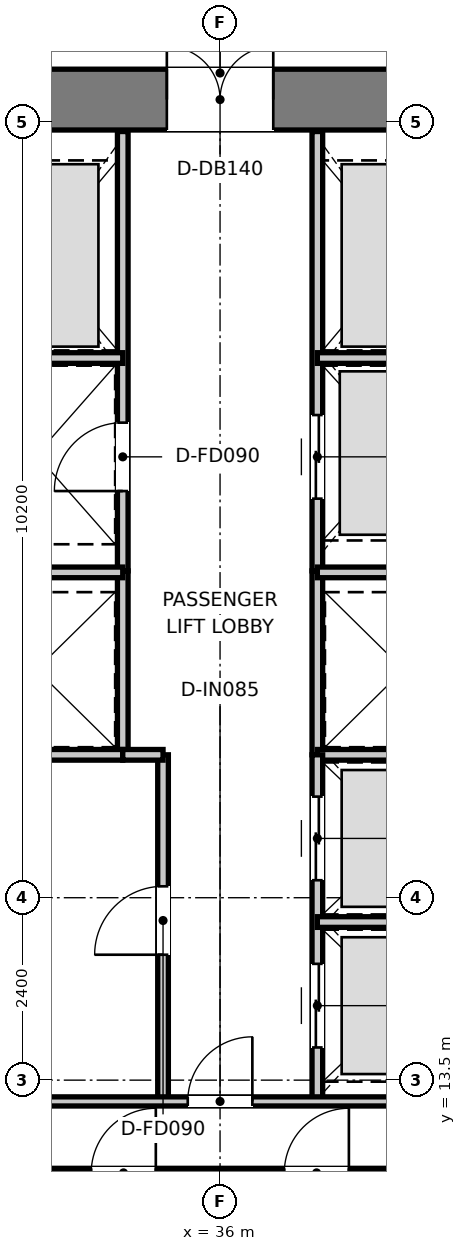
"""IFC4 building model, lengths in metres.
Left out: names, types, materials, properties, quantities, classifications, styles, units other than length and angle.
Written with IfcOpenShell. Run it as: python <this file> out.ifc"""

import sys

from ifc_helpers import new_model, si_unit, direction, frame, frame_2d, origin, place, context, subcontext, project, spatial, rectangle, extrude, element, fill, save


model = new_model("IFC4")
c1 = context("Model", 3, precision=1e-05, world=origin(), true_north=direction((0.0, 1.0)))
c2 = subcontext(c1, "Body", "Model", "MODEL_VIEW")
j1 = project(units=[si_unit("LENGTHUNIT", "METRE"), si_unit("PLANEANGLEUNIT", "RADIAN")], contexts=[c1])
p1 = place(None, origin())
s1 = spatial("IfcSite", under=j1, at=p1, CompositionType="ELEMENT")
p2 = place(p1, origin())
s2 = spatial("IfcBuilding", under=s1, at=p2, CompositionType="ELEMENT")
p3 = place(p2, frame((0.0, 0.0, 219.15)))
s3 = spatial("IfcBuildingStorey", under=s2, at=p3, CompositionType="ELEMENT", Elevation=219.15)
p4 = place(p3, frame((28.08, 26.4, 0.0), z_axis=(0.0, 0.0, 1.0), x_axis=(1.0, 0.0, 0.0)))
e1 = element("IfcWall", 1, at=p4, inside=s3, PredefinedType="SHEAR", context=c2, shape_type="SweptSolid", body=[
    extrude(rectangle(XDim=15.84, YDim=0.8, at=frame_2d((7.92, 0.0))), origin(), (0.0, 0.0, 1.0), 3.95),
])
p5 = place(p4, frame((7.22, 0.0, 0.0)))
e2 = element("IfcOpeningElement", 2, at=p5, cuts=e1, PredefinedType="OPENING", context=c2, shape_type="SweptSolid", body=[
    extrude(rectangle(XDim=1.4, YDim=2.2, at=frame_2d((0.7, 1.1))), frame((0.0, 0.41, 0.0), z_axis=(0.0, -1.0, 0.0), x_axis=(1.0, 0.0, 0.0)), (0.0, 0.0, 1.0), 0.82),
])
p6 = place(p4, frame((1.775, 0.0, 0.0)))
e3 = element("IfcOpeningElement", 3, at=p6, cuts=e1, PredefinedType="OPENING", context=c2, shape_type="SweptSolid", body=[
    extrude(rectangle(XDim=1.05, YDim=2.1, at=frame_2d((0.525, 1.05))), frame((0.0, 0.41, 0.0), z_axis=(0.0, -1.0, 0.0), x_axis=(1.0, 0.0, 0.0)), (0.0, 0.0, 1.0), 0.82),
])
p7 = place(p4, frame((13.015, 0.0, 0.0)))
e4 = element("IfcOpeningElement", 4, at=p7, cuts=e1, PredefinedType="OPENING", context=c2, shape_type="SweptSolid", body=[
    extrude(rectangle(XDim=1.05, YDim=2.1, at=frame_2d((0.525, 1.05))), frame((0.0, 0.41, 0.0), z_axis=(0.0, -1.0, 0.0), x_axis=(1.0, 0.0, 0.0)), (0.0, 0.0, 1.0), 0.82),
])
p8 = place(p3, frame((34.72, 20.2, 0.0), z_axis=(0.0, 0.0, 1.0), x_axis=(0.0, 1.0, 0.0)))
e5 = element("IfcWall", 5, at=p8, inside=s3, PredefinedType="PARTITIONING", context=c2, shape_type="SweptSolid", body=[
    extrude(rectangle(XDim=5.78, YDim=0.14, at=frame_2d((2.89, 0.0))), origin(), (0.0, 0.0, 1.0), 2.67),
])
p9 = place(p8, frame((1.05, 0.0, 0.0)))
e6 = element("IfcOpeningElement", 6, at=p9, cuts=e5, PredefinedType="OPENING", context=c2, shape_type="SweptSolid", body=[
    extrude(rectangle(XDim=0.9, YDim=2.1, at=frame_2d((0.45, 1.05))), frame((0.0, 0.08, 0.0), z_axis=(0.0, -1.0, 0.0), x_axis=(1.0, 0.0, 0.0)), (0.0, 0.0, 1.0), 0.16),
])
p10 = place(p3, frame((37.28, 20.2, 0.0), z_axis=(0.0, 0.0, 1.0), x_axis=(0.0, 1.0, 0.0)))
e7 = element("IfcWall", 7, at=p10, inside=s3, PredefinedType="PARTITIONING", context=c2, shape_type="SweptSolid", body=[
    extrude(rectangle(XDim=5.78, YDim=0.14, at=frame_2d((2.89, 0.0))), origin(), (0.0, 0.0, 1.0), 2.67),
])
p11 = place(p10, frame((0.95, 0.0, 0.0)))
e8 = element("IfcOpeningElement", 8, at=p11, cuts=e7, PredefinedType="OPENING", context=c2, shape_type="SweptSolid", body=[
    extrude(rectangle(XDim=1.1, YDim=2.15, at=frame_2d((0.55, 1.075))), frame((0.0, 0.08, 0.0), z_axis=(0.0, -1.0, 0.0), x_axis=(1.0, 0.0, 0.0)), (0.0, 0.0, 1.0), 0.16),
])
for number, where, z_axis, x_axis in (
    (9, (32.45, 23.0, 0.0), (0.0, 0.0, 1.0), (1.0, 0.0, 0.0)),
    (10, (37.28, 23.0, 0.0), (0.0, 0.0, 1.0), (1.0, 0.0, 0.0)),
):
    element("IfcWall", number, at=place(p3, frame(where, z_axis=z_axis, x_axis=x_axis)), inside=s3, PredefinedType="PARTITIONING", context=c2, shape_type="SweptSolid", body=[
        extrude(rectangle(XDim=2.27, YDim=0.14, at=frame_2d((1.135, 0.0))), origin(), (0.0, 0.0, 1.0), 2.67),
    ])
for number, where, z_axis, x_axis in (
    (11, (34.72, 17.78, 0.0), (0.0, 0.0, 1.0), (0.0, 1.0, 0.0)),
    (12, (37.28, 17.78, 0.0), (0.0, 0.0, 1.0), (0.0, 1.0, 0.0)),
):
    element("IfcWall", number, at=place(p3, frame(where, z_axis=z_axis, x_axis=x_axis)), inside=s3, PredefinedType="PARTITIONING", context=c2, shape_type="SweptSolid", body=[
        extrude(rectangle(XDim=2.42, YDim=0.14, at=frame_2d((1.21, 0.0))), origin(), (0.0, 0.0, 1.0), 3.67),
    ])
for number, where, z_axis, x_axis in (
    (13, (32.45, 17.78, 0.0), (0.0, 0.0, 1.0), (1.0, 0.0, 0.0)),
    (14, (32.45, 20.18, 0.0), (0.0, 0.0, 1.0), (1.0, 0.0, 0.0)),
    (15, (37.28, 17.78, 0.0), (0.0, 0.0, 1.0), (1.0, 0.0, 0.0)),
    (16, (37.28, 20.18, 0.0), (0.0, 0.0, 1.0), (1.0, 0.0, 0.0)),
):
    element("IfcWall", number, at=place(p3, frame(where, z_axis=z_axis, x_axis=x_axis)), inside=s3, PredefinedType="PARTITIONING", context=c2, shape_type="SweptSolid", body=[
        extrude(rectangle(XDim=2.27, YDim=0.14, at=frame_2d((1.135, 0.0))), origin(), (0.0, 0.0, 1.0), 3.67),
    ])
p12 = place(p3, frame((35.25, 13.22, 0.0), z_axis=(0.0, 0.0, 1.0), x_axis=(0.0, 1.0, 0.0)))
e17 = element("IfcWall", 17, at=p12, inside=s3, PredefinedType="PARTITIONING", context=c2, shape_type="SweptSolid", body=[
    extrude(rectangle(XDim=4.56, YDim=0.14, at=frame_2d((2.28, 0.0))), origin(), (0.0, 0.0, 1.0), 3.67),
])
p13 = place(p12, frame((1.93, 0.0, 0.0)))
e18 = element("IfcOpeningElement", 18, at=p13, cuts=e17, PredefinedType="OPENING", context=c2, shape_type="SweptSolid", body=[
    extrude(rectangle(XDim=0.9, YDim=2.1, at=frame_2d((0.45, 1.05))), frame((0.0, 0.08, 0.0), z_axis=(0.0, -1.0, 0.0), x_axis=(1.0, 0.0, 0.0)), (0.0, 0.0, 1.0), 0.16),
])
p14 = place(p3, frame((34.72, 17.78, 0.0), z_axis=(0.0, 0.0, 1.0), x_axis=(1.0, 0.0, 0.0)))
e19 = element("IfcWall", 19, at=p14, inside=s3, PredefinedType="PARTITIONING", context=c2, shape_type="SweptSolid", body=[
    extrude(rectangle(XDim=0.53, YDim=0.14, at=frame_2d((0.265, 0.0))), origin(), (0.0, 0.0, 1.0), 3.67),
])
p15 = place(p3, frame((37.28, 13.22, 0.0), z_axis=(0.0, 0.0, 1.0), x_axis=(0.0, 1.0, 0.0)))
e20 = element("IfcWall", 20, at=p15, inside=s3, PredefinedType="PARTITIONING", context=c2, shape_type="SweptSolid", body=[
    extrude(rectangle(XDim=4.56, YDim=0.14, at=frame_2d((2.28, 0.0))), origin(), (0.0, 0.0, 1.0), 3.67),
])
p16 = place(p15, frame((0.71, 0.0, 0.0)))
e21 = element("IfcOpeningElement", 21, at=p16, cuts=e20, PredefinedType="OPENING", context=c2, shape_type="SweptSolid", body=[
    extrude(rectangle(XDim=1.1, YDim=2.15, at=frame_2d((0.55, 1.075))), frame((0.0, 0.08, 0.0), z_axis=(0.0, -1.0, 0.0), x_axis=(1.0, 0.0, 0.0)), (0.0, 0.0, 1.0), 0.16),
])
p17 = place(p15, frame((2.91, 0.0, 0.0)))
e22 = element("IfcOpeningElement", 22, at=p17, cuts=e20, PredefinedType="OPENING", context=c2, shape_type="SweptSolid", body=[
    extrude(rectangle(XDim=1.1, YDim=2.15, at=frame_2d((0.55, 1.075))), frame((0.0, 0.08, 0.0), z_axis=(0.0, -1.0, 0.0), x_axis=(1.0, 0.0, 0.0)), (0.0, 0.0, 1.0), 0.16),
])
p18 = place(p3, frame((37.28, 15.58, 0.0), z_axis=(0.0, 0.0, 1.0), x_axis=(1.0, 0.0, 0.0)))
e23 = element("IfcWall", 23, at=p18, inside=s3, PredefinedType="PARTITIONING", context=c2, shape_type="SweptSolid", body=[
    extrude(rectangle(XDim=2.27, YDim=0.14, at=frame_2d((1.135, 0.0))), origin(), (0.0, 0.0, 1.0), 3.67),
])
p19 = place(p3, frame((32.21, 13.22, 0.0), z_axis=(0.0, 0.0, 1.0), x_axis=(1.0, 0.0, 0.0)))
e24 = element("IfcWall", 24, at=p19, inside=s3, PredefinedType="PARTITIONING", context=c2, shape_type="SweptSolid", body=[
    extrude(rectangle(XDim=7.58, YDim=0.12, at=frame_2d((3.79, 0.0))), origin(), (0.0, 0.0, 1.0), 3.67),
])
p20 = place(p19, frame((3.365, 0.0, 0.0)))
e25 = element("IfcOpeningElement", 25, at=p20, cuts=e24, PredefinedType="OPENING", context=c2, shape_type="SweptSolid", body=[
    extrude(rectangle(XDim=0.85, YDim=2.1, at=frame_2d((0.425, 1.05))), frame((0.0, 0.07, 0.0), z_axis=(0.0, -1.0, 0.0), x_axis=(1.0, 0.0, 0.0)), (0.0, 0.0, 1.0), 0.14),
])
p21 = place(p3, frame((32.21, 12.28, 0.0), z_axis=(0.0, 0.0, 1.0), x_axis=(1.0, 0.0, 0.0)))
e26 = element("IfcWall", 26, at=p21, inside=s3, PredefinedType="PARTITIONING", context=c2, shape_type="SweptSolid", body=[
    extrude(rectangle(XDim=7.58, YDim=0.12, at=frame_2d((3.79, 0.0))), origin(), (0.0, 0.0, 1.0), 3.67),
])
p22 = place(p21, frame((0.205, 0.0, 0.0)))
e27 = element("IfcOpeningElement", 27, at=p22, cuts=e26, PredefinedType="OPENING", context=c2, shape_type="SweptSolid", body=[
    extrude(rectangle(XDim=0.85, YDim=2.1, at=frame_2d((0.425, 1.05))), frame((0.0, 0.07, 0.0), z_axis=(0.0, -1.0, 0.0), x_axis=(1.0, 0.0, 0.0)), (0.0, 0.0, 1.0), 0.14),
])
p23 = place(p21, frame((2.095, 0.0, 0.0)))
e28 = element("IfcOpeningElement", 28, at=p23, cuts=e26, PredefinedType="OPENING", context=c2, shape_type="SweptSolid", body=[
    extrude(rectangle(XDim=0.85, YDim=2.1, at=frame_2d((0.425, 1.05))), frame((0.0, 0.07, 0.0), z_axis=(0.0, -1.0, 0.0), x_axis=(1.0, 0.0, 0.0)), (0.0, 0.0, 1.0), 0.14),
])
p24 = place(p21, frame((4.635, 0.0, 0.0)))
e29 = element("IfcOpeningElement", 29, at=p24, cuts=e26, PredefinedType="OPENING", context=c2, shape_type="SweptSolid", body=[
    extrude(rectangle(XDim=0.85, YDim=2.1, at=frame_2d((0.425, 1.05))), frame((0.0, 0.07, 0.0), z_axis=(0.0, -1.0, 0.0), x_axis=(1.0, 0.0, 0.0)), (0.0, 0.0, 1.0), 0.14),
])
p25 = place(p21, frame((6.525, 0.0, 0.0)))
e30 = element("IfcOpeningElement", 30, at=p25, cuts=e26, PredefinedType="OPENING", context=c2, shape_type="SweptSolid", body=[
    extrude(rectangle(XDim=0.85, YDim=2.1, at=frame_2d((0.425, 1.05))), frame((0.0, 0.07, 0.0), z_axis=(0.0, -1.0, 0.0), x_axis=(1.0, 0.0, 0.0)), (0.0, 0.0, 1.0), 0.14),
])
p26 = place(p5, origin())
e31 = element("IfcDoor", 31, at=p26, inside=s3, OperationType="DOUBLE_DOOR_SINGLE_SWING", PredefinedType="DOOR", context=c2, shape_type="SweptSolid", body=[
    extrude(rectangle(XDim=1.4, YDim=2.2, at=frame_2d((0.7, 1.1))), frame((0.0, 0.025, 0.0), z_axis=(0.0, -1.0, 0.0), x_axis=(1.0, 0.0, 0.0)), (0.0, 0.0, 1.0), 0.05),
])
fill(e2, e31)
p27 = place(p9, origin())
e32 = element("IfcDoor", 32, at=p27, inside=s3, OperationType="SINGLE_SWING_LEFT", PredefinedType="DOOR", context=c2, shape_type="SweptSolid", body=[
    extrude(rectangle(XDim=0.9, YDim=2.1, at=frame_2d((0.45, 1.05))), frame((0.0, 0.025, 0.0), z_axis=(0.0, -1.0, 0.0), x_axis=(1.0, 0.0, 0.0)), (0.0, 0.0, 1.0), 0.05),
])
fill(e6, e32)
p28 = place(p11, origin())
e33 = element("IfcDoor", 33, at=p28, inside=s3, OperationType="DOUBLE_DOOR_SLIDING", PredefinedType="DOOR", context=c2, shape_type="SweptSolid", body=[
    extrude(rectangle(XDim=1.1, YDim=2.15, at=frame_2d((0.55, 1.075))), frame((0.0, 0.025, 0.0), z_axis=(0.0, -1.0, 0.0), x_axis=(1.0, 0.0, 0.0)), (0.0, 0.0, 1.0), 0.05),
])
fill(e8, e33)
p29 = place(p13, origin())
e34 = element("IfcDoor", 34, at=p29, inside=s3, OperationType="SINGLE_SWING_LEFT", PredefinedType="DOOR", context=c2, shape_type="SweptSolid", body=[
    extrude(rectangle(XDim=0.9, YDim=2.1, at=frame_2d((0.45, 1.05))), frame((0.0, 0.025, 0.0), z_axis=(0.0, -1.0, 0.0), x_axis=(1.0, 0.0, 0.0)), (0.0, 0.0, 1.0), 0.05),
])
fill(e18, e34)
p30 = place(p16, origin())
e35 = element("IfcDoor", 35, at=p30, inside=s3, OperationType="DOUBLE_DOOR_SLIDING", PredefinedType="DOOR", context=c2, shape_type="SweptSolid", body=[
    extrude(rectangle(XDim=1.1, YDim=2.15, at=frame_2d((0.55, 1.075))), frame((0.0, 0.025, 0.0), z_axis=(0.0, -1.0, 0.0), x_axis=(1.0, 0.0, 0.0)), (0.0, 0.0, 1.0), 0.05),
])
fill(e21, e35)
p31 = place(p17, origin())
e36 = element("IfcDoor", 36, at=p31, inside=s3, OperationType="DOUBLE_DOOR_SLIDING", PredefinedType="DOOR", context=c2, shape_type="SweptSolid", body=[
    extrude(rectangle(XDim=1.1, YDim=2.15, at=frame_2d((0.55, 1.075))), frame((0.0, 0.025, 0.0), z_axis=(0.0, -1.0, 0.0), x_axis=(1.0, 0.0, 0.0)), (0.0, 0.0, 1.0), 0.05),
])
fill(e22, e36)
p32 = place(p20, origin())
e37 = element("IfcDoor", 37, at=p32, inside=s3, OperationType="SINGLE_SWING_RIGHT", PredefinedType="DOOR", context=c2, shape_type="SweptSolid", body=[
    extrude(rectangle(XDim=0.85, YDim=2.1, at=frame_2d((0.425, 1.05))), frame((0.0, 0.025, 0.0), z_axis=(0.0, -1.0, 0.0), x_axis=(1.0, 0.0, 0.0)), (0.0, 0.0, 1.0), 0.05),
])
fill(e25, e37)
p33 = place(p23, origin())
e38 = element("IfcDoor", 38, at=p33, inside=s3, OperationType="SINGLE_SWING_RIGHT", PredefinedType="DOOR", context=c2, shape_type="SweptSolid", body=[
    extrude(rectangle(XDim=0.85, YDim=2.1, at=frame_2d((0.425, 1.05))), frame((0.0, 0.025, 0.0), z_axis=(0.0, -1.0, 0.0), x_axis=(1.0, 0.0, 0.0)), (0.0, 0.0, 1.0), 0.05),
])
fill(e28, e38)
p34 = place(p24, origin())
e39 = element("IfcDoor", 39, at=p34, inside=s3, OperationType="SINGLE_SWING_RIGHT", PredefinedType="DOOR", context=c2, shape_type="SweptSolid", body=[
    extrude(rectangle(XDim=0.85, YDim=2.1, at=frame_2d((0.425, 1.05))), frame((0.0, 0.025, 0.0), z_axis=(0.0, -1.0, 0.0), x_axis=(1.0, 0.0, 0.0)), (0.0, 0.0, 1.0), 0.05),
])
fill(e29, e39)
save(model, sys.argv[1])
